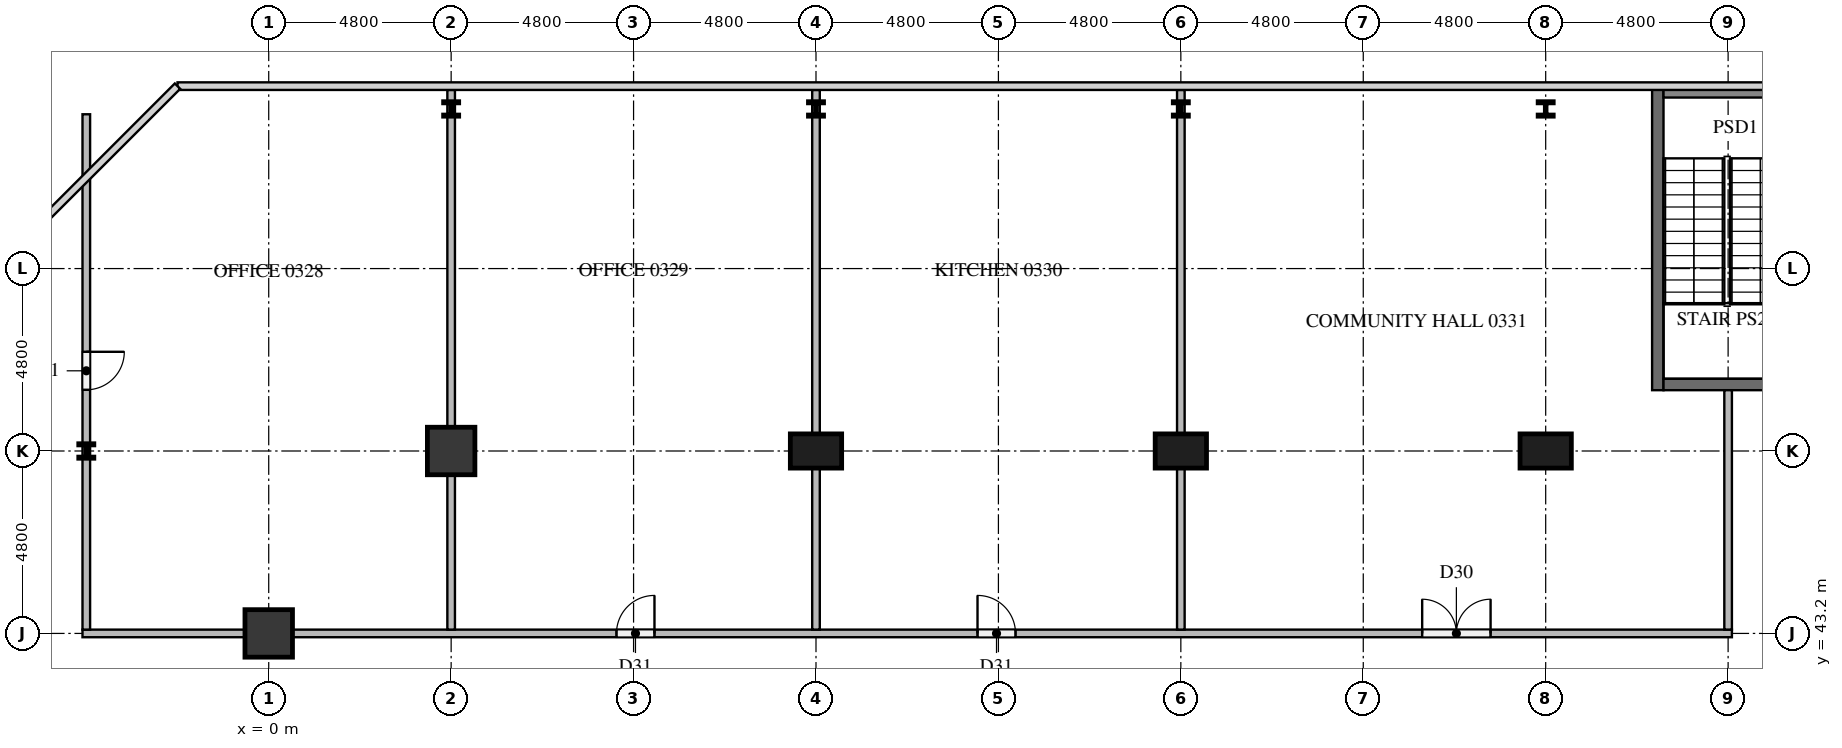
"""IFC4 building model, lengths in metres.
Left out: names, types, materials, properties, quantities, classifications, styles, units other than length and angle.
Written with IfcOpenShell. Run it as: python <this file> out.ifc"""

import sys

from ifc_helpers import new_model, si_unit, direction, frame, frame_2d, origin, origin_2d, place, context, subcontext, project, spatial, rectangle, i_section, extrude, element, fill, save


model = new_model("IFC4")
c1 = context("Model", 3, precision=1e-05, world=origin(), true_north=direction((0.0, 1.0)))
c2 = subcontext(c1, "Body", "Model", "MODEL_VIEW")
j1 = project(units=[si_unit("LENGTHUNIT", "METRE"), si_unit("PLANEANGLEUNIT", "RADIAN")], contexts=[c1])
p1 = place(None, origin())
s1 = spatial("IfcSite", under=j1, at=p1, CompositionType="ELEMENT")
p2 = place(p1, origin())
s2 = spatial("IfcBuilding", under=s1, at=p2, CompositionType="ELEMENT")
p3 = place(p2, frame((0.0, 0.0, 15.0)))
s3 = spatial("IfcBuildingStorey", under=s2, at=p3, CompositionType="ELEMENT", Elevation=15.0)
p4 = place(p3, frame((36.55, 49.6, 0.0), z_axis=(0.0, 0.0, 1.0), x_axis=(0.0, 1.0, 0.0)))
e1 = element("IfcWall", 1, at=p4, inside=s3, PredefinedType="SOLIDWALL", context=c2, shape_type="SweptSolid", body=[
    extrude(rectangle(XDim=8.0, YDim=0.3, at=frame_2d((4.0, 0.0))), origin(), (0.0, 0.0, 1.0), 4.2),
])
for number, where, z_axis, x_axis in (
    (2, (36.7, 49.75, 0.0), (0.0, 0.0, 1.0), (1.0, 0.0, 0.0)),
    (3, (36.7, 57.45, 0.0), (0.0, 0.0, 1.0), (1.0, 0.0, 0.0)),
):
    element("IfcWall", number, at=place(p3, frame(where, z_axis=z_axis, x_axis=x_axis)), inside=s3, PredefinedType="SOLIDWALL", context=c2, shape_type="SweptSolid", body=[
        extrude(rectangle(XDim=3.35, YDim=0.3, at=frame_2d((1.675, 0.0))), origin(), (0.0, 0.0, 1.0), 4.2),
    ])
for number, where, z_axis, x_axis in (
    (4, (33.6, 48.0, 0.0), (0.0, 0.0, 1.0), (1.0, 0.0, 0.0)),
    (5, (24.0, 48.0, 0.0), (0.0, 0.0, 1.0), (1.0, 0.0, 0.0)),
    (6, (14.4, 48.0, 0.0), (0.0, 0.0, 1.0), (1.0, 0.0, 0.0)),
):
    element("IfcColumn", number, at=place(p3, frame(where, z_axis=z_axis, x_axis=x_axis)), inside=s3, PredefinedType="COLUMN", context=c2, shape_type="SweptSolid", body=[
        extrude(rectangle(XDim=1.35, YDim=0.9, at=origin_2d()), origin(), (0.0, 0.0, 1.0), 4.2),
    ])
for number, where, z_axis, x_axis in (
    (7, (4.8, 48.0, 0.0), (0.0, 0.0, 1.0), (1.0, 0.0, 0.0)),
    (8, (0.0, 43.2, 0.0), (0.0, 0.0, 1.0), (1.0, 0.0, 0.0)),
):
    element("IfcColumn", number, at=place(p3, frame(where, z_axis=z_axis, x_axis=x_axis)), inside=s3, PredefinedType="COLUMN", context=c2, shape_type="SweptSolid", body=[
        extrude(rectangle(XDim=1.25, YDim=1.25, at=origin_2d()), origin(), (0.0, 0.0, 1.0), 4.2),
    ])
for number, where, z_axis, x_axis in (
    (9, (-4.8, 48.0, 0.0), (0.0, 0.0, 1.0), (1.0, 0.0, 0.0)),
    (10, (4.8, 57.0, 0.0), (0.0, 0.0, 1.0), (1.0, 0.0, 0.0)),
    (11, (14.4, 57.0, 0.0), (0.0, 0.0, 1.0), (1.0, 0.0, 0.0)),
    (12, (24.0, 57.0, 0.0), (0.0, 0.0, 1.0), (1.0, 0.0, 0.0)),
    (13, (33.6, 57.0, 0.0), (0.0, 0.0, 1.0), (1.0, 0.0, 0.0)),
):
    element("IfcColumn", number, at=place(p3, frame(where, z_axis=z_axis, x_axis=x_axis)), inside=s3, PredefinedType="COLUMN", context=c2, shape_type="SweptSolid", body=[
        extrude(i_section(OverallWidth=0.396, OverallDepth=0.381, WebThickness=0.019, FlangeThickness=0.03, at=origin_2d()), origin(), (0.0, 0.0, 1.0), 4.2),
    ])
p5 = place(p3, frame((-4.9, 43.2, 0.0), z_axis=(0.0, 0.0, 1.0), x_axis=(1.0, 0.0, 0.0)))
e14 = element("IfcWall", 14, at=p5, inside=s3, PredefinedType="PARTITIONING", context=c2, shape_type="SweptSolid", body=[
    extrude(rectangle(XDim=43.4, YDim=0.2, at=frame_2d((21.7, 0.0))), origin(), (0.0, 0.0, 1.0), 4.2),
])
p6 = place(p5, frame((14.05, 0.0, 0.0)))
e15 = element("IfcOpeningElement", 15, at=p6, cuts=e14, PredefinedType="OPENING", context=c2, shape_type="SweptSolid", body=[
    extrude(rectangle(XDim=1.0, YDim=2.1, at=frame_2d((0.5, 1.05))), frame((0.0, 0.11, 0.0), z_axis=(0.0, -1.0, 0.0), x_axis=(1.0, 0.0, 0.0)), (0.0, 0.0, 1.0), 0.22),
])
p7 = place(p5, frame((23.55, 0.0, 0.0)))
e16 = element("IfcOpeningElement", 16, at=p7, cuts=e14, PredefinedType="OPENING", context=c2, shape_type="SweptSolid", body=[
    extrude(rectangle(XDim=1.0, YDim=2.1, at=frame_2d((0.5, 1.05))), frame((0.0, 0.11, 0.0), z_axis=(0.0, -1.0, 0.0), x_axis=(1.0, 0.0, 0.0)), (0.0, 0.0, 1.0), 0.22),
])
p8 = place(p5, frame((35.25, 0.0, 0.0)))
e17 = element("IfcOpeningElement", 17, at=p8, cuts=e14, PredefinedType="OPENING", context=c2, shape_type="SweptSolid", body=[
    extrude(rectangle(XDim=1.8, YDim=2.1, at=frame_2d((0.9, 1.05))), frame((0.0, 0.11, 0.0), z_axis=(0.0, -1.0, 0.0), x_axis=(1.0, 0.0, 0.0)), (0.0, 0.0, 1.0), 0.22),
])
p9 = place(p3, frame((-4.8, 56.86, 0.0), z_axis=(0.0, 0.0, 1.0), x_axis=(0.0, -1.0, 0.0)))
e18 = element("IfcWall", 18, at=p9, inside=s3, PredefinedType="PARTITIONING", context=c2, shape_type="SweptSolid", body=[
    extrude(rectangle(XDim=13.56, YDim=0.2, at=frame_2d((6.78, 0.0))), origin(), (0.0, 0.0, 1.0), 4.2),
])
p10 = place(p9, frame((6.25, 0.0, 0.0)))
e19 = element("IfcOpeningElement", 19, at=p10, cuts=e18, PredefinedType="OPENING", context=c2, shape_type="SweptSolid", body=[
    extrude(rectangle(XDim=1.0, YDim=2.1, at=frame_2d((0.5, 1.05))), frame((0.0, 0.11, 0.0), z_axis=(0.0, -1.0, 0.0), x_axis=(1.0, 0.0, 0.0)), (0.0, 0.0, 1.0), 0.22),
])
for number, where, z_axis, x_axis in (
    (20, (4.8, 43.3, 0.0), (0.0, 0.0, 1.0), (0.0, 1.0, 0.0)),
    (21, (14.4, 43.3, 0.0), (0.0, 0.0, 1.0), (0.0, 1.0, 0.0)),
    (22, (24.0, 43.3, 0.0), (0.0, 0.0, 1.0), (0.0, 1.0, 0.0)),
):
    element("IfcWall", number, at=place(p3, frame(where, z_axis=z_axis, x_axis=x_axis)), inside=s3, PredefinedType="PARTITIONING", context=c2, shape_type="SweptSolid", body=[
        extrude(rectangle(XDim=14.2, YDim=0.2, at=frame_2d((7.1, 0.0))), origin(), (0.0, 0.0, 1.0), 4.2),
    ])
p11 = place(p3, frame((38.4, 43.3, 0.0), z_axis=(0.0, 0.0, 1.0), x_axis=(0.0, 1.0, 0.0)))
e23 = element("IfcWall", 23, at=p11, inside=s3, PredefinedType="PARTITIONING", context=c2, shape_type="SweptSolid", body=[
    extrude(rectangle(XDim=6.3, YDim=0.2, at=frame_2d((3.15, 0.0))), origin(), (0.0, 0.0, 1.0), 4.2),
])
p12 = place(p10, origin())
e24 = element("IfcDoor", 24, at=p12, inside=s3, OperationType="SINGLE_SWING_LEFT", PredefinedType="DOOR", context=c2, shape_type="SweptSolid", body=[
    extrude(rectangle(XDim=1.0, YDim=2.1, at=frame_2d((0.5, 1.05))), frame((0.0, 0.025, 0.0), z_axis=(0.0, -1.0, 0.0), x_axis=(1.0, 0.0, 0.0)), (0.0, 0.0, 1.0), 0.05),
])
fill(e19, e24)
p13 = place(p6, origin())
e25 = element("IfcDoor", 25, at=p13, inside=s3, OperationType="SINGLE_SWING_RIGHT", PredefinedType="DOOR", context=c2, shape_type="SweptSolid", body=[
    extrude(rectangle(XDim=1.0, YDim=2.1, at=frame_2d((0.5, 1.05))), frame((0.0, 0.025, 0.0), z_axis=(0.0, -1.0, 0.0), x_axis=(1.0, 0.0, 0.0)), (0.0, 0.0, 1.0), 0.05),
])
fill(e15, e25)
p14 = place(p7, origin())
e26 = element("IfcDoor", 26, at=p14, inside=s3, OperationType="SINGLE_SWING_LEFT", PredefinedType="DOOR", context=c2, shape_type="SweptSolid", body=[
    extrude(rectangle(XDim=1.0, YDim=2.1, at=frame_2d((0.5, 1.05))), frame((0.0, 0.025, 0.0), z_axis=(0.0, -1.0, 0.0), x_axis=(1.0, 0.0, 0.0)), (0.0, 0.0, 1.0), 0.05),
])
fill(e16, e26)
p15 = place(p8, origin())
e27 = element("IfcDoor", 27, at=p15, inside=s3, OperationType="DOUBLE_DOOR_SINGLE_SWING", PredefinedType="DOOR", context=c2, shape_type="SweptSolid", body=[
    extrude(rectangle(XDim=1.8, YDim=2.1, at=frame_2d((0.9, 1.05))), frame((0.0, 0.025, 0.0), z_axis=(0.0, -1.0, 0.0), x_axis=(1.0, 0.0, 0.0)), (0.0, 0.0, 1.0), 0.05),
])
fill(e17, e27)
save(model, sys.argv[1])
